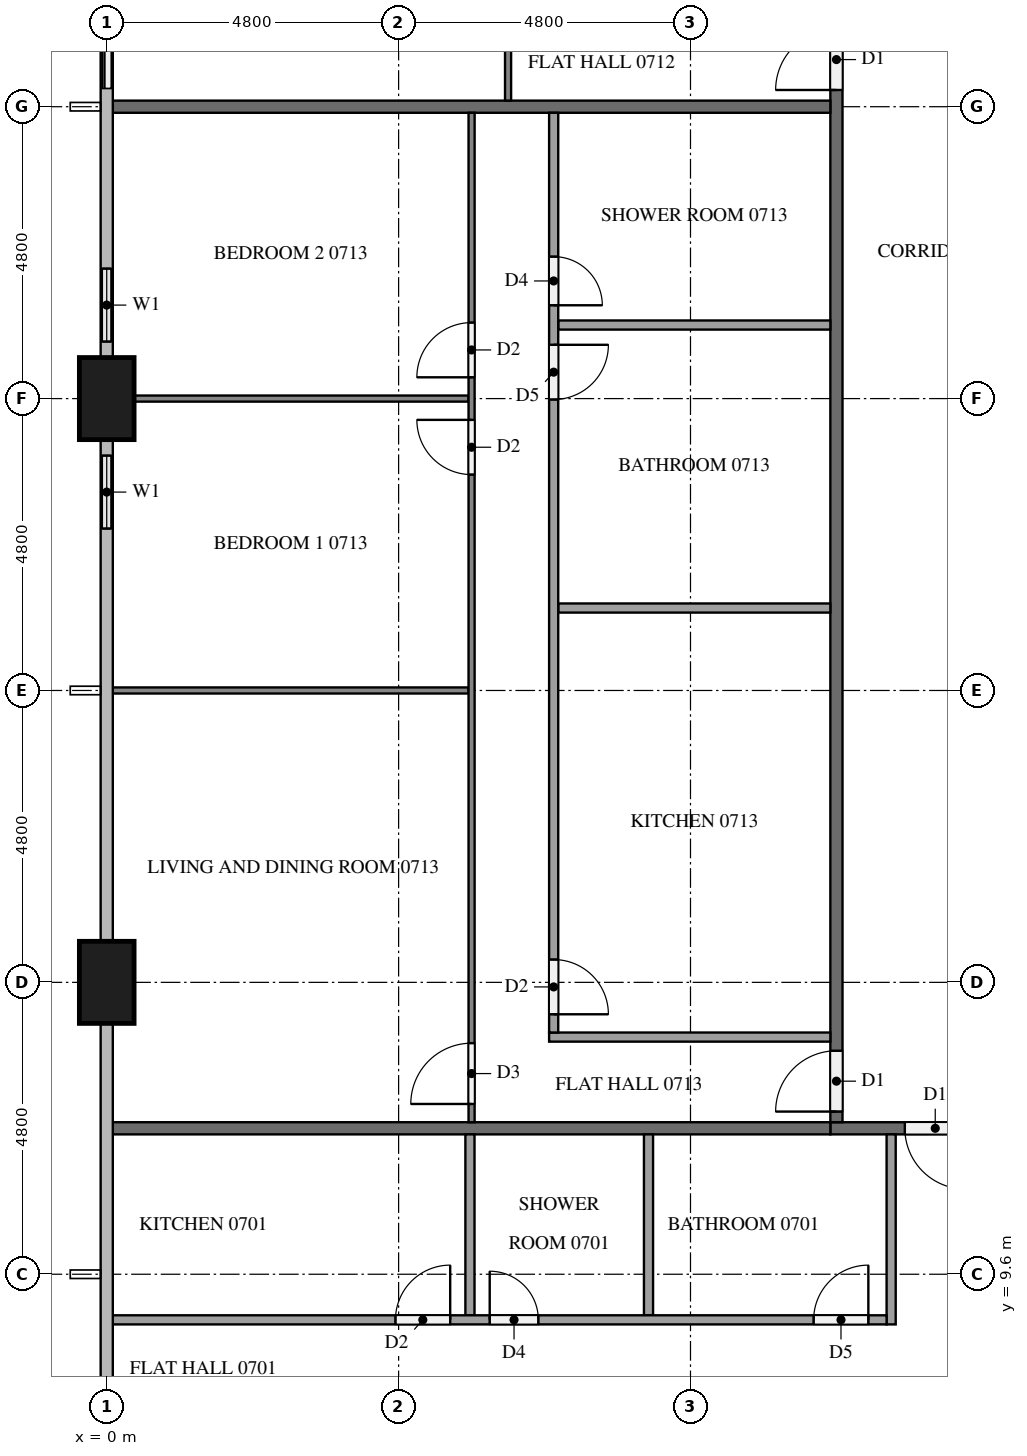
"""IFC4 building model, lengths in metres.
Left out: names, types, materials, properties, quantities, classifications, styles, units other than length and angle.
Written with IfcOpenShell. Run it as: python <this file> out.ifc"""

import sys

from ifc_helpers import new_model, si_unit, direction, frame, frame_2d, origin, origin_2d, place, context, subcontext, project, spatial, rectangle, extrude, element, fill, save


model = new_model("IFC4")
c1 = context("Model", 3, precision=1e-05, world=origin(), true_north=direction((0.0, 1.0)))
c2 = subcontext(c1, "Body", "Model", "MODEL_VIEW")
j1 = project(units=[si_unit("LENGTHUNIT", "METRE"), si_unit("PLANEANGLEUNIT", "RADIAN")], contexts=[c1])
p1 = place(None, origin())
s1 = spatial("IfcSite", under=j1, at=p1, CompositionType="ELEMENT")
p2 = place(p1, origin())
s2 = spatial("IfcBuilding", under=s1, at=p2, CompositionType="ELEMENT")
p3 = place(p2, frame((0.0, 0.0, 32.9)))
s3 = spatial("IfcBuildingStorey", under=s2, at=p3, CompositionType="ELEMENT", Elevation=32.9)
for number, where, z_axis, x_axis in (
    (1, (0.0, 24.0, 0.0), (0.0, 0.0, 1.0), (0.0, 1.0, 0.0)),
    (2, (0.0, 14.4, 0.0), (0.0, 0.0, 1.0), (0.0, 1.0, 0.0)),
):
    element("IfcColumn", number, at=place(p3, frame(where, z_axis=z_axis, x_axis=x_axis)), inside=s3, PredefinedType="COLUMN", context=c2, shape_type="SweptSolid", body=[
        extrude(rectangle(XDim=1.35, YDim=0.9, at=origin_2d()), origin(), (0.0, 0.0, 1.0), 3.2),
    ])
p4 = place(p3, frame((0.0, 31.2, 0.0), z_axis=(0.0, 0.0, 1.0), x_axis=(0.0, -1.0, 0.0)))
e3 = element("IfcWall", 3, at=p4, inside=s3, PredefinedType="SOLIDWALL", context=c2, shape_type="SweptSolid", body=[
    extrude(rectangle(XDim=2.4, YDim=0.15, at=frame_2d((1.2, 0.0))), origin(), (0.0, 0.0, 1.0), 3.2),
])
p5 = place(p4, frame((0.3, 0.0, 0.0)))
e4 = element("IfcOpeningElement", 4, at=p5, cuts=e3, PredefinedType="OPENING", context=c2, shape_type="SweptSolid", body=[
    extrude(rectangle(XDim=1.8, YDim=2.4, at=frame_2d((0.9, 1.2))), frame((0.0, 0.085, 0.0), z_axis=(0.0, -1.0, 0.0), x_axis=(1.0, 0.0, 0.0)), (0.0, 0.0, 1.0), 0.17),
])
p6 = place(p3, frame((0.0, 26.4, 0.0), z_axis=(0.0, 0.0, 1.0), x_axis=(0.0, -1.0, 0.0)))
e5 = element("IfcWall", 5, at=p6, inside=s3, PredefinedType="SOLIDWALL", context=c2, shape_type="SweptSolid", body=[
    extrude(rectangle(XDim=1.725, YDim=0.15, at=frame_2d((0.862, 0.0))), origin(), (0.0, 0.0, 1.0), 3.2),
])
p7 = place(p6, frame((0.262, 0.0, 0.9)))
e6 = element("IfcOpeningElement", 6, at=p7, cuts=e5, PredefinedType="OPENING", context=c2, shape_type="SweptSolid", body=[
    extrude(rectangle(XDim=1.2, YDim=1.4, at=frame_2d((0.6, 0.7))), frame((0.0, 0.085, 0.0), z_axis=(0.0, -1.0, 0.0), x_axis=(1.0, 0.0, 0.0)), (0.0, 0.0, 1.0), 0.17),
])
p8 = place(p3, frame((0.0, 23.325, 0.0), z_axis=(0.0, 0.0, 1.0), x_axis=(0.0, -1.0, 0.0)))
e7 = element("IfcWall", 7, at=p8, inside=s3, PredefinedType="SOLIDWALL", context=c2, shape_type="SweptSolid", body=[
    extrude(rectangle(XDim=1.725, YDim=0.15, at=frame_2d((0.862, 0.0))), origin(), (0.0, 0.0, 1.0), 3.2),
])
p9 = place(p8, frame((0.262, 0.0, 0.9)))
e8 = element("IfcOpeningElement", 8, at=p9, cuts=e7, PredefinedType="OPENING", context=c2, shape_type="SweptSolid", body=[
    extrude(rectangle(XDim=1.2, YDim=1.4, at=frame_2d((0.6, 0.7))), frame((0.0, 0.085, 0.0), z_axis=(0.0, -1.0, 0.0), x_axis=(1.0, 0.0, 0.0)), (0.0, 0.0, 1.0), 0.17),
])
p10 = place(p3, frame((50.5, 12.0, 0.0), z_axis=(0.0, 0.0, 1.0), x_axis=(-1.0, 0.0, 0.0)))
e9 = element("IfcWall", 9, at=p10, inside=s3, PredefinedType="PARTITIONING", context=c2, shape_type="SweptSolid", body=[
    extrude(rectangle(XDim=38.6, YDim=0.2, at=frame_2d((19.3, 0.0))), origin(), (0.0, 0.0, 1.0), 3.2),
])
p11 = place(p10, frame((36.375, 0.0, 0.0)))
e10 = element("IfcOpeningElement", 10, at=p11, cuts=e9, PredefinedType="OPENING", context=c2, shape_type="SweptSolid", body=[
    extrude(rectangle(XDim=1.0, YDim=2.1, at=frame_2d((0.5, 1.05))), frame((0.0, 0.11, 0.0), z_axis=(0.0, -1.0, 0.0), x_axis=(1.0, 0.0, 0.0)), (0.0, 0.0, 1.0), 0.22),
])
p12 = place(p10, frame((34.825, 0.0, 0.0)))
e11 = element("IfcOpeningElement", 11, at=p12, cuts=e9, PredefinedType="OPENING", context=c2, shape_type="SweptSolid", body=[
    extrude(rectangle(XDim=1.0, YDim=2.1, at=frame_2d((0.5, 1.05))), frame((0.0, 0.11, 0.0), z_axis=(0.0, -1.0, 0.0), x_axis=(1.0, 0.0, 0.0)), (0.0, 0.0, 1.0), 0.22),
])
p13 = place(p10, frame((22.825, 0.0, 0.0)))
e12 = element("IfcOpeningElement", 12, at=p13, cuts=e9, PredefinedType="OPENING", context=c2, shape_type="SweptSolid", body=[
    extrude(rectangle(XDim=1.0, YDim=2.1, at=frame_2d((0.5, 1.05))), frame((0.0, 0.11, 0.0), z_axis=(0.0, -1.0, 0.0), x_axis=(1.0, 0.0, 0.0)), (0.0, 0.0, 1.0), 0.22),
])
p14 = place(p10, frame((8.425, 0.0, 0.0)))
e13 = element("IfcOpeningElement", 13, at=p14, cuts=e9, PredefinedType="OPENING", context=c2, shape_type="SweptSolid", body=[
    extrude(rectangle(XDim=1.0, YDim=2.1, at=frame_2d((0.5, 1.05))), frame((0.0, 0.11, 0.0), z_axis=(0.0, -1.0, 0.0), x_axis=(1.0, 0.0, 0.0)), (0.0, 0.0, 1.0), 0.22),
])
p15 = place(p10, frame((1.225, 0.0, 0.0)))
e14 = element("IfcOpeningElement", 14, at=p15, cuts=e9, PredefinedType="OPENING", context=c2, shape_type="SweptSolid", body=[
    extrude(rectangle(XDim=1.0, YDim=2.1, at=frame_2d((0.5, 1.05))), frame((0.0, 0.11, 0.0), z_axis=(0.0, -1.0, 0.0), x_axis=(1.0, 0.0, 0.0)), (0.0, 0.0, 1.0), 0.22),
])
p16 = place(p3, frame((12.0, 12.1, 0.0), z_axis=(0.0, 0.0, 1.0), x_axis=(0.0, 1.0, 0.0)))
e15 = element("IfcWall", 15, at=p16, inside=s3, PredefinedType="PARTITIONING", context=c2, shape_type="SweptSolid", body=[
    extrude(rectangle(XDim=28.6, YDim=0.2, at=frame_2d((14.3, 0.0))), origin(), (0.0, 0.0, 1.0), 3.2),
])
p17 = place(p16, frame((16.975, 0.0, 0.0)))
e16 = element("IfcOpeningElement", 16, at=p17, cuts=e15, PredefinedType="OPENING", context=c2, shape_type="SweptSolid", body=[
    extrude(rectangle(XDim=1.0, YDim=2.1, at=frame_2d((0.5, 1.05))), frame((0.0, 0.11, 0.0), z_axis=(0.0, -1.0, 0.0), x_axis=(1.0, 0.0, 0.0)), (0.0, 0.0, 1.0), 0.22),
])
p18 = place(p16, frame((0.175, 0.0, 0.0)))
e17 = element("IfcOpeningElement", 17, at=p18, cuts=e15, PredefinedType="OPENING", context=c2, shape_type="SweptSolid", body=[
    extrude(rectangle(XDim=1.0, YDim=2.1, at=frame_2d((0.5, 1.05))), frame((0.0, 0.11, 0.0), z_axis=(0.0, -1.0, 0.0), x_axis=(1.0, 0.0, 0.0)), (0.0, 0.0, 1.0), 0.22),
])
for number, where, z_axis, x_axis in (
    (18, (0.1, 12.0, 0.0), (0.0, 0.0, 1.0), (1.0, 0.0, 0.0)),
    (19, (0.1, 28.8, 0.0), (0.0, 0.0, 1.0), (1.0, 0.0, 0.0)),
):
    element("IfcWall", number, at=place(p3, frame(where, z_axis=z_axis, x_axis=x_axis)), inside=s3, PredefinedType="PARTITIONING", context=c2, shape_type="SweptSolid", body=[
        extrude(rectangle(XDim=11.8, YDim=0.2, at=frame_2d((5.9, 0.0))), origin(), (0.0, 0.0, 1.0), 3.2),
    ])
for number, where, z_axis, x_axis in (
    (20, (8.91, 11.9, 0.0), (0.0, 0.0, 1.0), (0.0, -1.0, 0.0)),
    (21, (5.973, 11.9, 0.0), (0.0, 0.0, 1.0), (0.0, -1.0, 0.0)),
):
    element("IfcWall", number, at=place(p3, frame(where, z_axis=z_axis, x_axis=x_axis)), inside=s3, PredefinedType="PARTITIONING", context=c2, shape_type="SweptSolid", body=[
        extrude(rectangle(XDim=2.975, YDim=0.15, at=frame_2d((1.487, 0.0))), origin(), (0.0, 0.0, 1.0), 3.2),
    ])
p19 = place(p3, frame((12.9, 11.9, 0.0), z_axis=(0.0, 0.0, 1.0), x_axis=(0.0, -1.0, 0.0)))
e22 = element("IfcWall", 22, at=p19, inside=s3, PredefinedType="PARTITIONING", context=c2, shape_type="SweptSolid", body=[
    extrude(rectangle(XDim=3.125, YDim=0.15, at=frame_2d((1.562, 0.0))), origin(), (0.0, 0.0, 1.0), 3.2),
])
p20 = place(p3, frame((0.1, 8.85, 0.0), z_axis=(0.0, 0.0, 1.0), x_axis=(1.0, 0.0, 0.0)))
e23 = element("IfcWall", 23, at=p20, inside=s3, PredefinedType="PARTITIONING", context=c2, shape_type="SweptSolid", body=[
    extrude(rectangle(XDim=12.725, YDim=0.15, at=frame_2d((6.362, 0.0))), origin(), (0.0, 0.0, 1.0), 3.2),
])
p21 = place(p20, frame((11.525, 0.0, 0.0)))
e24 = element("IfcOpeningElement", 24, at=p21, cuts=e23, PredefinedType="OPENING", context=c2, shape_type="SweptSolid", body=[
    extrude(rectangle(XDim=0.9, YDim=2.1, at=frame_2d((0.45, 1.05))), frame((0.0, 0.085, 0.0), z_axis=(0.0, -1.0, 0.0), x_axis=(1.0, 0.0, 0.0)), (0.0, 0.0, 1.0), 0.17),
])
p22 = place(p20, frame((6.198, 0.0, 0.0)))
e25 = element("IfcOpeningElement", 25, at=p22, cuts=e23, PredefinedType="OPENING", context=c2, shape_type="SweptSolid", body=[
    extrude(rectangle(XDim=0.8, YDim=2.1, at=frame_2d((0.4, 1.05))), frame((0.0, 0.085, 0.0), z_axis=(0.0, -1.0, 0.0), x_axis=(1.0, 0.0, 0.0)), (0.0, 0.0, 1.0), 0.17),
])
p23 = place(p20, frame((4.648, 0.0, 0.0)))
e26 = element("IfcOpeningElement", 26, at=p23, cuts=e23, PredefinedType="OPENING", context=c2, shape_type="SweptSolid", body=[
    extrude(rectangle(XDim=0.9, YDim=2.1, at=frame_2d((0.45, 1.05))), frame((0.0, 0.085, 0.0), z_axis=(0.0, -1.0, 0.0), x_axis=(1.0, 0.0, 0.0)), (0.0, 0.0, 1.0), 0.17),
])
p24 = place(p3, frame((6.6, 28.9, 0.0), z_axis=(0.0, 0.0, 1.0), x_axis=(0.0, 1.0, 0.0)))
e27 = element("IfcWall", 27, at=p24, inside=s3, PredefinedType="PARTITIONING", context=c2, shape_type="SweptSolid", body=[
    extrude(rectangle(XDim=11.8, YDim=0.1, at=frame_2d((5.9, 0.0))), origin(), (0.0, 0.0, 1.0), 3.2),
])
p25 = place(p24, frame((5.75, 0.0, 0.0)))
e28 = element("IfcOpeningElement", 28, at=p25, cuts=e27, PredefinedType="OPENING", context=c2, shape_type="SweptSolid", body=[
    extrude(rectangle(XDim=1.0, YDim=2.1, at=frame_2d((0.5, 1.05))), frame((0.0, 0.06, 0.0), z_axis=(0.0, -1.0, 0.0), x_axis=(1.0, 0.0, 0.0)), (0.0, 0.0, 1.0), 0.12),
])
p26 = place(p24, frame((7.45, 0.0, 0.0)))
e29 = element("IfcOpeningElement", 29, at=p26, cuts=e27, PredefinedType="OPENING", context=c2, shape_type="SweptSolid", body=[
    extrude(rectangle(XDim=0.9, YDim=2.1, at=frame_2d((0.45, 1.05))), frame((0.0, 0.06, 0.0), z_axis=(0.0, -1.0, 0.0), x_axis=(1.0, 0.0, 0.0)), (0.0, 0.0, 1.0), 0.12),
])
p27 = place(p3, frame((5.95, 19.2, 0.0), z_axis=(0.0, 0.0, 1.0), x_axis=(-1.0, 0.0, 0.0)))
e30 = element("IfcWall", 30, at=p27, inside=s3, PredefinedType="PARTITIONING", context=c2, shape_type="SweptSolid", body=[
    extrude(rectangle(XDim=5.85, YDim=0.1, at=frame_2d((2.925, 0.0))), origin(), (0.0, 0.0, 1.0), 3.2),
])
p28 = place(p3, frame((5.95, 24.0, 0.0), z_axis=(0.0, 0.0, 1.0), x_axis=(-1.0, 0.0, 0.0)))
e31 = element("IfcWall", 31, at=p28, inside=s3, PredefinedType="PARTITIONING", context=c2, shape_type="SweptSolid", body=[
    extrude(rectangle(XDim=5.5, YDim=0.1, at=frame_2d((2.75, 0.0))), origin(), (0.0, 0.0, 1.0), 3.2),
])
p29 = place(p3, frame((6.0, 12.1, 0.0), z_axis=(0.0, 0.0, 1.0), x_axis=(0.0, 1.0, 0.0)))
e32 = element("IfcWall", 32, at=p29, inside=s3, PredefinedType="PARTITIONING", context=c2, shape_type="SweptSolid", body=[
    extrude(rectangle(XDim=16.6, YDim=0.1, at=frame_2d((8.3, 0.0))), origin(), (0.0, 0.0, 1.0), 3.2),
])
p30 = place(p29, frame((0.3, 0.0, 0.0)))
e33 = element("IfcOpeningElement", 33, at=p30, cuts=e32, PredefinedType="OPENING", context=c2, shape_type="SweptSolid", body=[
    extrude(rectangle(XDim=1.0, YDim=2.1, at=frame_2d((0.5, 1.05))), frame((0.0, 0.06, 0.0), z_axis=(0.0, -1.0, 0.0), x_axis=(1.0, 0.0, 0.0)), (0.0, 0.0, 1.0), 0.12),
])
p31 = place(p29, frame((10.65, 0.0, 0.0)))
e34 = element("IfcOpeningElement", 34, at=p31, cuts=e32, PredefinedType="OPENING", context=c2, shape_type="SweptSolid", body=[
    extrude(rectangle(XDim=0.9, YDim=2.1, at=frame_2d((0.45, 1.05))), frame((0.0, 0.06, 0.0), z_axis=(0.0, -1.0, 0.0), x_axis=(1.0, 0.0, 0.0)), (0.0, 0.0, 1.0), 0.12),
])
p32 = place(p29, frame((12.25, 0.0, 0.0)))
e35 = element("IfcOpeningElement", 35, at=p32, cuts=e32, PredefinedType="OPENING", context=c2, shape_type="SweptSolid", body=[
    extrude(rectangle(XDim=0.9, YDim=2.1, at=frame_2d((0.45, 1.05))), frame((0.0, 0.06, 0.0), z_axis=(0.0, -1.0, 0.0), x_axis=(1.0, 0.0, 0.0)), (0.0, 0.0, 1.0), 0.12),
])
for number, where, z_axis, x_axis in (
    (36, (11.9, 20.556, 0.0), (0.0, 0.0, 1.0), (-1.0, 0.0, 0.0)),
    (37, (11.9, 25.21, 0.0), (0.0, 0.0, 1.0), (-1.0, 0.0, 0.0)),
):
    element("IfcWall", number, at=place(p3, frame(where, z_axis=z_axis, x_axis=x_axis)), inside=s3, PredefinedType="PARTITIONING", context=c2, shape_type="SweptSolid", body=[
        extrude(rectangle(XDim=4.475, YDim=0.15, at=frame_2d((2.237, 0.0))), origin(), (0.0, 0.0, 1.0), 3.2),
    ])
p33 = place(p3, frame((11.9, 13.5, 0.0), z_axis=(0.0, 0.0, 1.0), x_axis=(-1.0, 0.0, 0.0)))
e38 = element("IfcWall", 38, at=p33, inside=s3, PredefinedType="PARTITIONING", context=c2, shape_type="SweptSolid", body=[
    extrude(rectangle(XDim=4.625, YDim=0.15, at=frame_2d((2.312, 0.0))), origin(), (0.0, 0.0, 1.0), 3.2),
])
p34 = place(p3, frame((7.35, 28.7, 0.0), z_axis=(0.0, 0.0, 1.0), x_axis=(0.0, -1.0, 0.0)))
e39 = element("IfcWall", 39, at=p34, inside=s3, PredefinedType="PARTITIONING", context=c2, shape_type="SweptSolid", body=[
    extrude(rectangle(XDim=15.125, YDim=0.15, at=frame_2d((7.562, 0.0))), origin(), (0.0, 0.0, 1.0), 3.2),
])
p35 = place(p34, frame((13.925, 0.0, 0.0)))
e40 = element("IfcOpeningElement", 40, at=p35, cuts=e39, PredefinedType="OPENING", context=c2, shape_type="SweptSolid", body=[
    extrude(rectangle(XDim=0.9, YDim=2.1, at=frame_2d((0.45, 1.05))), frame((0.0, 0.085, 0.0), z_axis=(0.0, -1.0, 0.0), x_axis=(1.0, 0.0, 0.0)), (0.0, 0.0, 1.0), 0.17),
])
p36 = place(p34, frame((3.815, 0.0, 0.0)))
e41 = element("IfcOpeningElement", 41, at=p36, cuts=e39, PredefinedType="OPENING", context=c2, shape_type="SweptSolid", body=[
    extrude(rectangle(XDim=0.9, YDim=2.1, at=frame_2d((0.45, 1.05))), frame((0.0, 0.085, 0.0), z_axis=(0.0, -1.0, 0.0), x_axis=(1.0, 0.0, 0.0)), (0.0, 0.0, 1.0), 0.17),
])
p37 = place(p34, frame((2.365, 0.0, 0.0)))
e42 = element("IfcOpeningElement", 42, at=p37, cuts=e39, PredefinedType="OPENING", context=c2, shape_type="SweptSolid", body=[
    extrude(rectangle(XDim=0.8, YDim=2.1, at=frame_2d((0.4, 1.05))), frame((0.0, 0.085, 0.0), z_axis=(0.0, -1.0, 0.0), x_axis=(1.0, 0.0, 0.0)), (0.0, 0.0, 1.0), 0.17),
])
p38 = place(p5, origin())
e43 = element("IfcDoor", 43, at=p38, inside=s3, OperationType="SLIDING_TO_RIGHT", PredefinedType="DOOR", context=c2, shape_type="SweptSolid", body=[
    extrude(rectangle(XDim=1.8, YDim=2.4, at=frame_2d((0.9, 1.2))), frame((0.0, 0.025, 0.0), z_axis=(0.0, -1.0, 0.0), x_axis=(1.0, 0.0, 0.0)), (0.0, 0.0, 1.0), 0.05),
])
fill(e4, e43)
p39 = place(p7, origin())
e44 = element("IfcWindow", 44, at=p39, inside=s3, PartitioningType="SINGLE_PANEL", PredefinedType="WINDOW", context=c2, shape_type="SweptSolid", body=[
    extrude(rectangle(XDim=1.2, YDim=1.4, at=frame_2d((0.6, 0.7))), frame((0.0, 0.03, 0.0), z_axis=(0.0, -1.0, 0.0), x_axis=(1.0, 0.0, 0.0)), (0.0, 0.0, 1.0), 0.06),
])
fill(e6, e44)
p40 = place(p9, origin())
e45 = element("IfcWindow", 45, at=p40, inside=s3, PartitioningType="SINGLE_PANEL", PredefinedType="WINDOW", context=c2, shape_type="SweptSolid", body=[
    extrude(rectangle(XDim=1.2, YDim=1.4, at=frame_2d((0.6, 0.7))), frame((0.0, 0.03, 0.0), z_axis=(0.0, -1.0, 0.0), x_axis=(1.0, 0.0, 0.0)), (0.0, 0.0, 1.0), 0.06),
])
fill(e8, e45)
p41 = place(p11, origin())
e46 = element("IfcDoor", 46, at=p41, inside=s3, OperationType="SINGLE_SWING_LEFT", PredefinedType="DOOR", context=c2, shape_type="SweptSolid", body=[
    extrude(rectangle(XDim=1.0, YDim=2.1, at=frame_2d((0.5, 1.05))), frame((0.0, 0.025, 0.0), z_axis=(0.0, -1.0, 0.0), x_axis=(1.0, 0.0, 0.0)), (0.0, 0.0, 1.0), 0.05),
])
fill(e10, e46)
p42 = place(p17, origin())
e47 = element("IfcDoor", 47, at=p42, inside=s3, OperationType="SINGLE_SWING_LEFT", PredefinedType="DOOR", context=c2, shape_type="SweptSolid", body=[
    extrude(rectangle(XDim=1.0, YDim=2.1, at=frame_2d((0.5, 1.05))), frame((0.0, 0.025, 0.0), z_axis=(0.0, -1.0, 0.0), x_axis=(1.0, 0.0, 0.0)), (0.0, 0.0, 1.0), 0.05),
])
fill(e16, e47)
p43 = place(p18, origin())
e48 = element("IfcDoor", 48, at=p43, inside=s3, OperationType="SINGLE_SWING_LEFT", PredefinedType="DOOR", context=c2, shape_type="SweptSolid", body=[
    extrude(rectangle(XDim=1.0, YDim=2.1, at=frame_2d((0.5, 1.05))), frame((0.0, 0.025, 0.0), z_axis=(0.0, -1.0, 0.0), x_axis=(1.0, 0.0, 0.0)), (0.0, 0.0, 1.0), 0.05),
])
fill(e17, e48)
p44 = place(p21, origin())
e49 = element("IfcDoor", 49, at=p44, inside=s3, OperationType="SINGLE_SWING_RIGHT", PredefinedType="DOOR", context=c2, shape_type="SweptSolid", body=[
    extrude(rectangle(XDim=0.9, YDim=2.1, at=frame_2d((0.45, 1.05))), frame((0.0, 0.025, 0.0), z_axis=(0.0, -1.0, 0.0), x_axis=(1.0, 0.0, 0.0)), (0.0, 0.0, 1.0), 0.05),
])
fill(e24, e49)
p45 = place(p22, origin())
e50 = element("IfcDoor", 50, at=p45, inside=s3, OperationType="SINGLE_SWING_LEFT", PredefinedType="DOOR", context=c2, shape_type="SweptSolid", body=[
    extrude(rectangle(XDim=0.8, YDim=2.1, at=frame_2d((0.4, 1.05))), frame((0.0, 0.025, 0.0), z_axis=(0.0, -1.0, 0.0), x_axis=(1.0, 0.0, 0.0)), (0.0, 0.0, 1.0), 0.05),
])
fill(e25, e50)
p46 = place(p23, origin())
e51 = element("IfcDoor", 51, at=p46, inside=s3, OperationType="SINGLE_SWING_RIGHT", PredefinedType="DOOR", context=c2, shape_type="SweptSolid", body=[
    extrude(rectangle(XDim=0.9, YDim=2.1, at=frame_2d((0.45, 1.05))), frame((0.0, 0.025, 0.0), z_axis=(0.0, -1.0, 0.0), x_axis=(1.0, 0.0, 0.0)), (0.0, 0.0, 1.0), 0.05),
])
fill(e26, e51)
p47 = place(p30, origin())
e52 = element("IfcDoor", 52, at=p47, inside=s3, OperationType="SINGLE_SWING_LEFT", PredefinedType="DOOR", context=c2, shape_type="SweptSolid", body=[
    extrude(rectangle(XDim=1.0, YDim=2.1, at=frame_2d((0.5, 1.05))), frame((0.0, 0.025, 0.0), z_axis=(0.0, -1.0, 0.0), x_axis=(1.0, 0.0, 0.0)), (0.0, 0.0, 1.0), 0.05),
])
fill(e33, e52)
p48 = place(p31, origin())
e53 = element("IfcDoor", 53, at=p48, inside=s3, OperationType="SINGLE_SWING_RIGHT", PredefinedType="DOOR", context=c2, shape_type="SweptSolid", body=[
    extrude(rectangle(XDim=0.9, YDim=2.1, at=frame_2d((0.45, 1.05))), frame((0.0, 0.025, 0.0), z_axis=(0.0, -1.0, 0.0), x_axis=(1.0, 0.0, 0.0)), (0.0, 0.0, 1.0), 0.05),
])
fill(e34, e53)
p49 = place(p32, origin())
e54 = element("IfcDoor", 54, at=p49, inside=s3, OperationType="SINGLE_SWING_LEFT", PredefinedType="DOOR", context=c2, shape_type="SweptSolid", body=[
    extrude(rectangle(XDim=0.9, YDim=2.1, at=frame_2d((0.45, 1.05))), frame((0.0, 0.025, 0.0), z_axis=(0.0, -1.0, 0.0), x_axis=(1.0, 0.0, 0.0)), (0.0, 0.0, 1.0), 0.05),
])
fill(e35, e54)
p50 = place(p35, origin())
e55 = element("IfcDoor", 55, at=p50, inside=s3, OperationType="SINGLE_SWING_RIGHT", PredefinedType="DOOR", context=c2, shape_type="SweptSolid", body=[
    extrude(rectangle(XDim=0.9, YDim=2.1, at=frame_2d((0.45, 1.05))), frame((0.0, 0.025, 0.0), z_axis=(0.0, -1.0, 0.0), x_axis=(1.0, 0.0, 0.0)), (0.0, 0.0, 1.0), 0.05),
])
fill(e40, e55)
p51 = place(p36, origin())
e56 = element("IfcDoor", 56, at=p51, inside=s3, OperationType="SINGLE_SWING_LEFT", PredefinedType="DOOR", context=c2, shape_type="SweptSolid", body=[
    extrude(rectangle(XDim=0.9, YDim=2.1, at=frame_2d((0.45, 1.05))), frame((0.0, 0.025, 0.0), z_axis=(0.0, -1.0, 0.0), x_axis=(1.0, 0.0, 0.0)), (0.0, 0.0, 1.0), 0.05),
])
fill(e41, e56)
p52 = place(p37, origin())
e57 = element("IfcDoor", 57, at=p52, inside=s3, OperationType="SINGLE_SWING_RIGHT", PredefinedType="DOOR", context=c2, shape_type="SweptSolid", body=[
    extrude(rectangle(XDim=0.8, YDim=2.1, at=frame_2d((0.4, 1.05))), frame((0.0, 0.025, 0.0), z_axis=(0.0, -1.0, 0.0), x_axis=(1.0, 0.0, 0.0)), (0.0, 0.0, 1.0), 0.05),
])
fill(e42, e57)
save(model, sys.argv[1])
